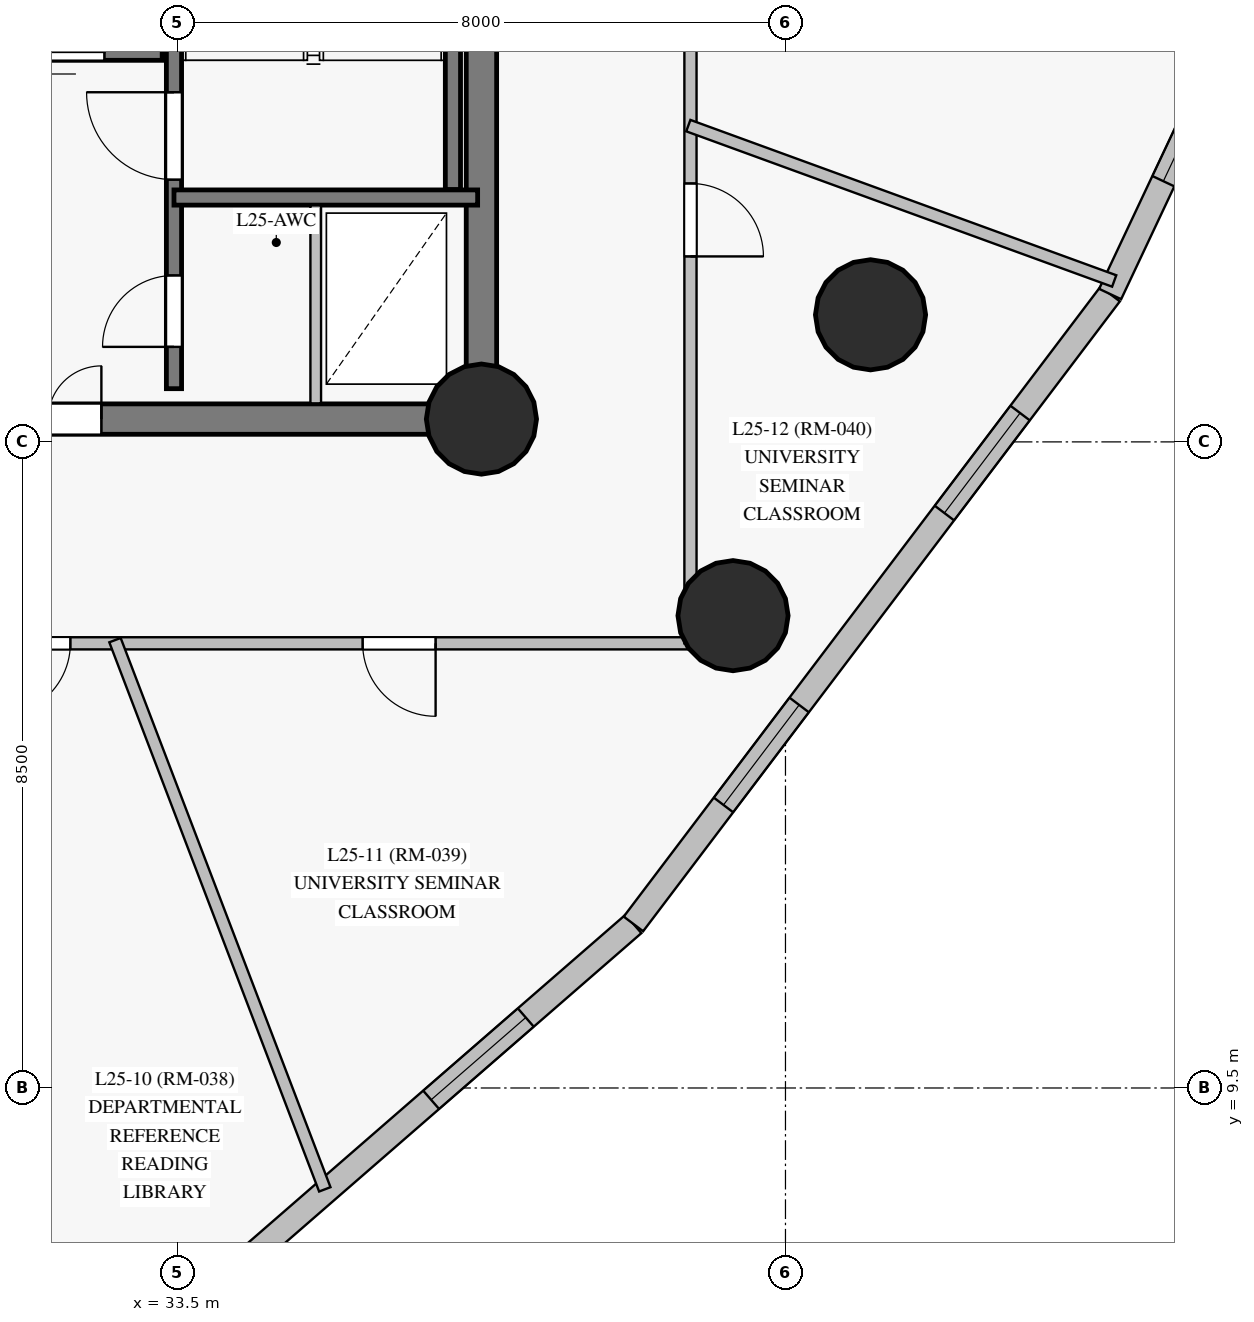
"""IFC4 building model, lengths in metres.
Left out: names, types, materials, properties, quantities, classifications, styles, units other than length and angle.
Written with IfcOpenShell. Run it as: python <this file> out.ifc"""

import sys

from ifc_helpers import new_model, si_unit, direction, frame, frame_2d, origin, origin_with_axes, origin_2d, place, context, subcontext, project, spatial, rectangle, circle, extrude, source, transform, mapped, element, fill, save


model = new_model("IFC4")
c1 = context("Model", 3, precision=1e-05, world=origin(), true_north=direction((0.0, 1.0)))
c2 = subcontext(c1, "Body", "Model", "MODEL_VIEW")
j1 = project(units=[si_unit("LENGTHUNIT", "METRE"), si_unit("PLANEANGLEUNIT", "RADIAN")], contexts=[c1])
p1 = place(None, origin())
s1 = spatial("IfcSite", under=j1, at=p1, CompositionType="ELEMENT")
p2 = place(p1, origin())
s2 = spatial("IfcBuilding", under=s1, at=p2, CompositionType="ELEMENT")
p3 = place(p2, frame((0.0, 0.0, 96.2)))
s3 = spatial("IfcBuildingStorey", under=s2, at=p3, CompositionType="ELEMENT", Elevation=96.2)
p4 = place(p3, frame((26.55, 18.3, 0.0), z_axis=(0.0, 0.0, 1.0), x_axis=(1.0, 0.0, 0.0)))
e1 = element("IfcWall", 1, at=p4, inside=s3, PredefinedType="SHEAR", context=c2, shape_type="SweptSolid", body=[
    extrude(rectangle(XDim=10.95, YDim=0.4, at=frame_2d((5.475, 0.0))), origin(), (0.0, 0.0, 1.0), 2.825),
])
p5 = place(p4, frame((4.55, 0.0, 0.0)))
e2 = element("IfcOpeningElement", 2, at=p5, cuts=e1, PredefinedType="OPENING", context=c2, shape_type="SweptSolid", body=[
    extrude(rectangle(XDim=1.4, YDim=2.2, at=frame_2d((0.7, 1.1))), frame((0.0, 0.21, 0.0), z_axis=(0.0, -1.0, 0.0), x_axis=(1.0, 0.0, 0.0)), (0.0, 0.0, 1.0), 0.42),
])
p6 = place(p3, frame((37.5, 18.3, 0.0), z_axis=(0.0, 0.0, 1.0), x_axis=(0.0, 1.0, 0.0)))
e3 = element("IfcWall", 3, at=p6, inside=s3, PredefinedType="SHEAR", context=c2, shape_type="SweptSolid", body=[
    extrude(rectangle(XDim=16.4, YDim=0.4, at=frame_2d((8.2, 0.0))), origin(), (0.0, 0.0, 1.0), 2.825),
])
p7 = place(p6, frame((14.15, 0.0, 0.0)))
e4 = element("IfcOpeningElement", 4, at=p7, cuts=e3, PredefinedType="OPENING", context=c2, shape_type="SweptSolid", body=[
    extrude(rectangle(XDim=1.2, YDim=2.15, at=frame_2d((0.6, 1.075))), frame((0.0, 0.21, 0.0), z_axis=(0.0, -1.0, 0.0), x_axis=(1.0, 0.0, 0.0)), (0.0, 0.0, 1.0), 0.42),
])
m1 = source(origin_with_axes(), c2, "Body", "SweptSolid", [
    extrude(circle(Radius=0.725, at=origin_2d()), origin(), (0.0, 0.0, 1.0), 3.05),
])
for number, where, z_axis, x_axis in (
    (5, (37.5, 18.3, 0.0), (0.0, 0.0, 1.0), (1.0, 0.0, 0.0)),
    (6, (42.619, 19.672, 0.0), (0.0, 0.0, 1.0), (1.0, 0.0, 0.0)),
    (7, (40.81, 15.714, 0.0), (0.0, 0.0, 1.0), (1.0, 0.0, 0.0)),
):
    element("IfcColumn", number, at=place(p3, frame(where, z_axis=z_axis, x_axis=x_axis)), inside=s3, PredefinedType="COLUMN", context=c2, shape_type="MappedRepresentation", body=[
        mapped(m1, transform((0.0, 0.0, 0.0), scale=1.0)),
    ])
p8 = place(p3, frame((28.218, 1.85, 0.0), z_axis=(0.0, 0.0, 1.0), x_axis=(0.754675133032, 0.65609865385, 0.0)))
e8 = element("IfcWall", 8, at=p8, inside=s3, PredefinedType="SOLIDWALL", context=c2, shape_type="SweptSolid", body=[
    extrude(rectangle(XDim=14.949, YDim=0.32, at=frame_2d((7.475, 0.0))), origin(), (0.0, 0.0, 1.0), 2.825),
])
p9 = place(p8, frame((1.813, 0.0, 0.85)))
e9 = element("IfcOpeningElement", 9, at=p9, cuts=e8, PredefinedType="OPENING", context=c2, shape_type="SweptSolid", body=[
    extrude(rectangle(XDim=1.65, YDim=1.65, at=frame_2d((0.825, 0.825))), frame((0.0, 0.17, 0.0), z_axis=(0.0, -1.0, 0.0), x_axis=(1.0, 0.0, 0.0)), (0.0, 0.0, 1.0), 0.34),
])
p10 = place(p8, frame((6.586, 0.0, 0.85)))
e10 = element("IfcOpeningElement", 10, at=p10, cuts=e8, PredefinedType="OPENING", context=c2, shape_type="SweptSolid", body=[
    extrude(rectangle(XDim=1.65, YDim=1.65, at=frame_2d((0.825, 0.825))), frame((0.0, 0.17, 0.0), z_axis=(0.0, -1.0, 0.0), x_axis=(1.0, 0.0, 0.0)), (0.0, 0.0, 1.0), 0.34),
])
p11 = place(p8, frame((11.423, 0.0, 0.85)))
e11 = element("IfcOpeningElement", 11, at=p11, cuts=e8, PredefinedType="OPENING", context=c2, shape_type="SweptSolid", body=[
    extrude(rectangle(XDim=1.65, YDim=1.65, at=frame_2d((0.825, 0.825))), frame((0.0, 0.17, 0.0), z_axis=(0.0, -1.0, 0.0), x_axis=(1.0, 0.0, 0.0)), (0.0, 0.0, 1.0), 0.34),
])
p12 = place(p3, frame((39.5, 11.658, 0.0), z_axis=(0.0, 0.0, 1.0), x_axis=(0.603493536032, 0.797367889978, 0.0)))
e12 = element("IfcWall", 12, at=p12, inside=s3, PredefinedType="SOLIDWALL", context=c2, shape_type="SweptSolid", body=[
    extrude(rectangle(XDim=10.393, YDim=0.32, at=frame_2d((5.196, 0.0))), origin(), (0.0, 0.0, 1.0), 2.825),
])
p13 = place(p12, frame((1.963, 0.0, 0.85)))
e13 = element("IfcOpeningElement", 13, at=p13, cuts=e12, PredefinedType="OPENING", context=c2, shape_type="SweptSolid", body=[
    extrude(rectangle(XDim=1.65, YDim=1.65, at=frame_2d((0.825, 0.825))), frame((0.0, 0.17, 0.0), z_axis=(0.0, -1.0, 0.0), x_axis=(1.0, 0.0, 0.0)), (0.0, 0.0, 1.0), 0.34),
])
p14 = place(p12, frame((6.78, 0.0, 0.85)))
e14 = element("IfcOpeningElement", 14, at=p14, cuts=e12, PredefinedType="OPENING", context=c2, shape_type="SweptSolid", body=[
    extrude(rectangle(XDim=1.65, YDim=1.65, at=frame_2d((0.825, 0.825))), frame((0.0, 0.17, 0.0), z_axis=(0.0, -1.0, 0.0), x_axis=(1.0, 0.0, 0.0)), (0.0, 0.0, 1.0), 0.34),
])
p15 = place(p3, frame((45.771, 19.945, 0.0), z_axis=(0.0, 0.0, 1.0), x_axis=(0.426458361985, 0.904507194827, 0.0)))
e15 = element("IfcWall", 15, at=p15, inside=s3, PredefinedType="SOLIDWALL", context=c2, shape_type="SweptSolid", body=[
    extrude(rectangle(XDim=14.949, YDim=0.32, at=frame_2d((7.475, 0.0))), origin(), (0.0, 0.0, 1.0), 2.825),
])
p16 = place(p15, frame((1.641, 0.0, 0.85)))
e16 = element("IfcOpeningElement", 16, at=p16, cuts=e15, PredefinedType="OPENING", context=c2, shape_type="SweptSolid", body=[
    extrude(rectangle(XDim=1.65, YDim=1.65, at=frame_2d((0.825, 0.825))), frame((0.0, 0.17, 0.0), z_axis=(0.0, -1.0, 0.0), x_axis=(1.0, 0.0, 0.0)), (0.0, 0.0, 1.0), 0.34),
])
p17 = place(p15, frame((5.584, 0.0, 0.85)))
e17 = element("IfcOpeningElement", 17, at=p17, cuts=e15, PredefinedType="OPENING", context=c2, shape_type="SweptSolid", body=[
    extrude(rectangle(XDim=1.65, YDim=1.65, at=frame_2d((0.825, 0.825))), frame((0.0, 0.17, 0.0), z_axis=(0.0, -1.0, 0.0), x_axis=(1.0, 0.0, 0.0)), (0.0, 0.0, 1.0), 0.34),
])
p18 = place(p15, frame((9.491, 0.0, 0.85)))
e18 = element("IfcOpeningElement", 18, at=p18, cuts=e15, PredefinedType="OPENING", context=c2, shape_type="SweptSolid", body=[
    extrude(rectangle(XDim=1.65, YDim=1.65, at=frame_2d((0.825, 0.825))), frame((0.0, 0.17, 0.0), z_axis=(0.0, -1.0, 0.0), x_axis=(1.0, 0.0, 0.0)), (0.0, 0.0, 1.0), 0.34),
])
p19 = place(p15, frame((12.586, 0.0, 0.85)))
e19 = element("IfcOpeningElement", 19, at=p19, cuts=e15, PredefinedType="OPENING", context=c2, shape_type="SweptSolid", body=[
    extrude(rectangle(XDim=1.65, YDim=1.65, at=frame_2d((0.825, 0.825))), frame((0.0, 0.17, 0.0), z_axis=(0.0, -1.0, 0.0), x_axis=(1.0, 0.0, 0.0)), (0.0, 0.0, 1.0), 0.34),
])
p20 = place(p3, frame((33.455, 18.7, 0.0), z_axis=(0.0, 0.0, 1.0), x_axis=(0.0, 1.0, 0.0)))
e20 = element("IfcWall", 20, at=p20, inside=s3, PredefinedType="SHEAR", context=c2, shape_type="SweptSolid", body=[
    extrude(rectangle(XDim=15.6, YDim=0.2, at=frame_2d((7.8, 0.0))), origin(), (0.0, 0.0, 1.0), 2.825),
])
p21 = place(p20, frame((2.75, 0.0, 0.0)))
e21 = element("IfcOpeningElement", 21, at=p21, cuts=e20, PredefinedType="OPENING", context=c2, shape_type="SweptSolid", body=[
    extrude(rectangle(XDim=1.15, YDim=2.15, at=frame_2d((0.575, 1.075))), frame((0.0, 0.11, 0.0), z_axis=(0.0, -1.0, 0.0), x_axis=(1.0, 0.0, 0.0)), (0.0, 0.0, 1.0), 0.22),
])
p22 = place(p20, frame((0.55, 0.0, 0.0)))
e22 = element("IfcOpeningElement", 22, at=p22, cuts=e20, PredefinedType="OPENING", context=c2, shape_type="SweptSolid", body=[
    extrude(rectangle(XDim=0.94, YDim=2.1, at=frame_2d((0.47, 1.05))), frame((0.0, 0.11, 0.0), z_axis=(0.0, -1.0, 0.0), x_axis=(1.0, 0.0, 0.0)), (0.0, 0.0, 1.0), 0.22),
])
p23 = place(p3, frame((23.7, 23.12, 0.0), z_axis=(0.0, 0.0, 1.0), x_axis=(1.0, 0.0, 0.0)))
e23 = element("IfcWall", 23, at=p23, inside=s3, PredefinedType="SHEAR", context=c2, shape_type="SweptSolid", body=[
    extrude(rectangle(XDim=9.6, YDim=0.2, at=frame_2d((4.8, 0.0))), origin(), (0.0, 0.0, 1.0), 2.825),
])
p24 = place(p23, frame((0.6, 0.0, 0.0)))
e24 = element("IfcOpeningElement", 24, at=p24, cuts=e23, PredefinedType="OPENING", context=c2, shape_type="SweptSolid", body=[
    extrude(rectangle(XDim=1.1, YDim=2.15, at=frame_2d((0.55, 1.075))), frame((0.0, 0.11, 0.0), z_axis=(0.0, -1.0, 0.0), x_axis=(1.0, 0.0, 0.0)), (0.0, 0.0, 1.0), 0.22),
])
p25 = place(p23, frame((2.98, 0.0, 0.0)))
e25 = element("IfcOpeningElement", 25, at=p25, cuts=e23, PredefinedType="OPENING", context=c2, shape_type="SweptSolid", body=[
    extrude(rectangle(XDim=1.1, YDim=2.15, at=frame_2d((0.55, 1.075))), frame((0.0, 0.11, 0.0), z_axis=(0.0, -1.0, 0.0), x_axis=(1.0, 0.0, 0.0)), (0.0, 0.0, 1.0), 0.22),
])
p26 = place(p23, frame((5.36, 0.0, 0.0)))
e26 = element("IfcOpeningElement", 26, at=p26, cuts=e23, PredefinedType="OPENING", context=c2, shape_type="SweptSolid", body=[
    extrude(rectangle(XDim=1.1, YDim=2.15, at=frame_2d((0.55, 1.075))), frame((0.0, 0.11, 0.0), z_axis=(0.0, -1.0, 0.0), x_axis=(1.0, 0.0, 0.0)), (0.0, 0.0, 1.0), 0.22),
])
p27 = place(p23, frame((7.74, 0.0, 0.0)))
e27 = element("IfcOpeningElement", 27, at=p27, cuts=e23, PredefinedType="OPENING", context=c2, shape_type="SweptSolid", body=[
    extrude(rectangle(XDim=1.1, YDim=2.15, at=frame_2d((0.55, 1.075))), frame((0.0, 0.11, 0.0), z_axis=(0.0, -1.0, 0.0), x_axis=(1.0, 0.0, 0.0)), (0.0, 0.0, 1.0), 0.22),
])
p28 = place(p3, frame((37.125, 21.32, 0.0), z_axis=(0.0, 0.0, 1.0), x_axis=(0.0, 1.0, 0.0)))
e28 = element("IfcWall", 28, at=p28, inside=s3, PredefinedType="SHEAR", context=c2, shape_type="SweptSolid", body=[
    extrude(rectangle(XDim=7.5, YDim=0.2, at=frame_2d((3.75, 0.0))), origin(), (0.0, 0.0, 1.0), 2.825),
])
p29 = place(p3, frame((33.455, 21.215, 0.0), z_axis=(0.0, 0.0, 1.0), x_axis=(1.0, 0.0, 0.0)))
e29 = element("IfcWall", 29, at=p29, inside=s3, PredefinedType="SHEAR", context=c2, shape_type="SweptSolid", body=[
    extrude(rectangle(XDim=3.995, YDim=0.2, at=frame_2d((1.998, 0.0))), origin(), (0.0, 0.0, 1.0), 2.825),
])
p30 = place(p3, frame((40.25, 15.35, 0.0), z_axis=(0.0, 0.0, 1.0), x_axis=(-1.0, 0.0, 0.0)))
e30 = element("IfcWall", 30, at=p30, inside=s3, PredefinedType="PARTITIONING", context=c2, shape_type="SweptSolid", body=[
    extrude(rectangle(XDim=29.75, YDim=0.16, at=frame_2d((14.875, 0.0))), origin(), (0.0, 0.0, 1.0), 2.225),
])
p31 = place(p30, frame((22.127, 0.0, 0.0)))
e31 = element("IfcOpeningElement", 31, at=p31, cuts=e30, PredefinedType="OPENING", context=c2, shape_type="SweptSolid", body=[
    extrude(rectangle(XDim=0.95, YDim=2.15, at=frame_2d((0.475, 1.075))), frame((0.0, 0.09, 0.0), z_axis=(0.0, -1.0, 0.0), x_axis=(1.0, 0.0, 0.0)), (0.0, 0.0, 1.0), 0.18),
])
p32 = place(p30, frame((14.4, 0.0, 0.0)))
e32 = element("IfcOpeningElement", 32, at=p32, cuts=e30, PredefinedType="OPENING", context=c2, shape_type="SweptSolid", body=[
    extrude(rectangle(XDim=0.96, YDim=2.15, at=frame_2d((0.48, 1.075))), frame((0.0, 0.09, 0.0), z_axis=(0.0, -1.0, 0.0), x_axis=(1.0, 0.0, 0.0)), (0.0, 0.0, 1.0), 0.18),
])
p33 = place(p30, frame((10.127, 0.0, 0.0)))
e33 = element("IfcOpeningElement", 33, at=p33, cuts=e30, PredefinedType="OPENING", context=c2, shape_type="SweptSolid", body=[
    extrude(rectangle(XDim=0.96, YDim=2.15, at=frame_2d((0.48, 1.075))), frame((0.0, 0.09, 0.0), z_axis=(0.0, -1.0, 0.0), x_axis=(1.0, 0.0, 0.0)), (0.0, 0.0, 1.0), 0.18),
])
p34 = place(p30, frame((8.158, 0.0, 0.0)))
e34 = element("IfcOpeningElement", 34, at=p34, cuts=e30, PredefinedType="OPENING", context=c2, shape_type="SweptSolid", body=[
    extrude(rectangle(XDim=0.95, YDim=2.15, at=frame_2d((0.475, 1.075))), frame((0.0, 0.09, 0.0), z_axis=(0.0, -1.0, 0.0), x_axis=(1.0, 0.0, 0.0)), (0.0, 0.0, 1.0), 0.18),
])
p35 = place(p30, frame((3.353, 0.0, 0.0)))
e35 = element("IfcOpeningElement", 35, at=p35, cuts=e30, PredefinedType="OPENING", context=c2, shape_type="SweptSolid", body=[
    extrude(rectangle(XDim=0.96, YDim=2.15, at=frame_2d((0.48, 1.075))), frame((0.0, 0.09, 0.0), z_axis=(0.0, -1.0, 0.0), x_axis=(1.0, 0.0, 0.0)), (0.0, 0.0, 1.0), 0.18),
])
p36 = place(p3, frame((40.25, 37.65, 0.0), z_axis=(0.0, 0.0, 1.0), x_axis=(0.0, -1.0, 0.0)))
e36 = element("IfcWall", 36, at=p36, inside=s3, PredefinedType="PARTITIONING", context=c2, shape_type="SweptSolid", body=[
    extrude(rectangle(XDim=22.3, YDim=0.16, at=frame_2d((11.15, 0.0))), origin(), (0.0, 0.0, 1.0), 2.225),
])
p37 = place(p36, frame((16.25, 0.0, 0.0)))
e37 = element("IfcOpeningElement", 37, at=p37, cuts=e36, PredefinedType="OPENING", context=c2, shape_type="SweptSolid", body=[
    extrude(rectangle(XDim=0.96, YDim=2.15, at=frame_2d((0.48, 1.075))), frame((0.0, 0.09, 0.0), z_axis=(0.0, -1.0, 0.0), x_axis=(1.0, 0.0, 0.0)), (0.0, 0.0, 1.0), 0.18),
])
p38 = place(p36, frame((10.675, 0.0, 0.0)))
e38 = element("IfcOpeningElement", 38, at=p38, cuts=e36, PredefinedType="OPENING", context=c2, shape_type="SweptSolid", body=[
    extrude(rectangle(XDim=0.95, YDim=2.15, at=frame_2d((0.475, 1.075))), frame((0.0, 0.09, 0.0), z_axis=(0.0, -1.0, 0.0), x_axis=(1.0, 0.0, 0.0)), (0.0, 0.0, 1.0), 0.18),
])
p39 = place(p36, frame((9.177, 0.0, 0.0)))
e39 = element("IfcOpeningElement", 39, at=p39, cuts=e36, PredefinedType="OPENING", context=c2, shape_type="SweptSolid", body=[
    extrude(rectangle(XDim=0.86, YDim=2.1, at=frame_2d((0.43, 1.05))), frame((0.0, 0.09, 0.0), z_axis=(0.0, -1.0, 0.0), x_axis=(1.0, 0.0, 0.0)), (0.0, 0.0, 1.0), 0.18),
])
p40 = place(p36, frame((7.33, 0.0, 0.0)))
e40 = element("IfcOpeningElement", 40, at=p40, cuts=e36, PredefinedType="OPENING", context=c2, shape_type="SweptSolid", body=[
    extrude(rectangle(XDim=0.96, YDim=2.15, at=frame_2d((0.48, 1.075))), frame((0.0, 0.09, 0.0), z_axis=(0.0, -1.0, 0.0), x_axis=(1.0, 0.0, 0.0)), (0.0, 0.0, 1.0), 0.18),
])
p41 = place(p36, frame((5.24, 0.0, 0.0)))
e41 = element("IfcOpeningElement", 41, at=p41, cuts=e36, PredefinedType="OPENING", context=c2, shape_type="SweptSolid", body=[
    extrude(rectangle(XDim=0.95, YDim=2.15, at=frame_2d((0.475, 1.075))), frame((0.0, 0.09, 0.0), z_axis=(0.0, -1.0, 0.0), x_axis=(1.0, 0.0, 0.0)), (0.0, 0.0, 1.0), 0.18),
])
p42 = place(p36, frame((2.38, 0.0, 0.0)))
e42 = element("IfcOpeningElement", 42, at=p42, cuts=e36, PredefinedType="OPENING", context=c2, shape_type="SweptSolid", body=[
    extrude(rectangle(XDim=0.96, YDim=2.15, at=frame_2d((0.48, 1.075))), frame((0.0, 0.09, 0.0), z_axis=(0.0, -1.0, 0.0), x_axis=(1.0, 0.0, 0.0)), (0.0, 0.0, 1.0), 0.18),
])
p43 = place(p3, frame((30.365, 15.394, 0.0), z_axis=(0.0, 0.0, 1.0), x_axis=(0.170863116861, -0.985294775839, 0.0)))
e43 = element("IfcWall", 43, at=p43, inside=s3, PredefinedType="PARTITIONING", context=c2, shape_type="SweptSolid", body=[
    extrude(rectangle(XDim=10.259, YDim=0.16, at=frame_2d((5.13, 0.0))), origin(), (0.0, 0.0, 1.0), 2.825),
])
p44 = place(p3, frame((32.679, 15.392, 0.0), z_axis=(0.0, 0.0, 1.0), x_axis=(0.356831287963, -0.934168845515, 0.0)))
e44 = element("IfcWall", 44, at=p44, inside=s3, PredefinedType="PARTITIONING", context=c2, shape_type="SweptSolid", body=[
    extrude(rectangle(XDim=7.735, YDim=0.16, at=frame_2d((3.867, 0.0))), origin(), (0.0, 0.0, 1.0), 2.825),
])
p45 = place(p3, frame((40.222, 22.161, 0.0), z_axis=(0.0, 0.0, 1.0), x_axis=(0.939457123794, -0.342666474217, 0.0)))
e45 = element("IfcWall", 45, at=p45, inside=s3, PredefinedType="PARTITIONING", context=c2, shape_type="SweptSolid", body=[
    extrude(rectangle(XDim=5.964, YDim=0.16, at=frame_2d((2.982, 0.0))), origin(), (0.0, 0.0, 1.0), 2.825),
])
p46 = place(p3, frame((35.32, 18.507, 0.0), z_axis=(0.0, 0.0, 1.0), x_axis=(0.0, 1.0, 0.0)))
e46 = element("IfcWall", 46, at=p46, inside=s3, PredefinedType="PARTITIONING", context=c2, shape_type="SweptSolid", body=[
    extrude(rectangle(XDim=2.604, YDim=0.14, at=frame_2d((1.302, 0.0))), origin(), (0.0, 0.0, 1.0), 2.825),
])
m2 = source(origin_with_axes(), c2, "Body", "SweptSolid", [
    extrude(rectangle(XDim=1.65, YDim=1.65, at=frame_2d((0.825, 0.825))), frame((0.0, 0.03, 0.0), z_axis=(0.0, -1.0, 0.0), x_axis=(1.0, 0.0, 0.0)), (0.0, 0.0, 1.0), 0.06),
])
p47 = place(p11, origin())
e47 = element("IfcWindow", 47, at=p47, inside=s3, PartitioningType="SINGLE_PANEL", PredefinedType="WINDOW", context=c2, shape_type="MappedRepresentation", body=[
    mapped(m2, transform((0.0, 0.0, 0.0), scale=1.0)),
])
fill(e11, e47)
p48 = place(p13, origin())
e48 = element("IfcWindow", 48, at=p48, inside=s3, PartitioningType="SINGLE_PANEL", PredefinedType="WINDOW", context=c2, shape_type="MappedRepresentation", body=[
    mapped(m2, transform((0.0, 0.0, 0.0), scale=1.0)),
])
fill(e13, e48)
p49 = place(p14, origin())
e49 = element("IfcWindow", 49, at=p49, inside=s3, PartitioningType="SINGLE_PANEL", PredefinedType="WINDOW", context=c2, shape_type="MappedRepresentation", body=[
    mapped(m2, transform((0.0, 0.0, 0.0), scale=1.0)),
])
fill(e14, e49)
p50 = place(p16, origin())
e50 = element("IfcWindow", 50, at=p50, inside=s3, PartitioningType="SINGLE_PANEL", PredefinedType="WINDOW", context=c2, shape_type="MappedRepresentation", body=[
    mapped(m2, transform((0.0, 0.0, 0.0), scale=1.0)),
])
fill(e16, e50)
m3 = source(origin_with_axes(), c2, "Body", "SweptSolid", [
    extrude(rectangle(XDim=1.15, YDim=2.15, at=frame_2d((0.575, 1.075))), frame((0.0, 0.025, 0.0), z_axis=(0.0, -1.0, 0.0), x_axis=(1.0, 0.0, 0.0)), (0.0, 0.0, 1.0), 0.05),
])
p51 = place(p21, origin())
e51 = element("IfcDoor", 51, at=p51, inside=s3, OperationType="SINGLE_SWING_RIGHT", PredefinedType="DOOR", context=c2, shape_type="MappedRepresentation", body=[
    mapped(m3, transform((0.0, 0.0, 0.0), scale=1.0)),
])
fill(e21, e51)
m4 = source(origin_with_axes(), c2, "Body", "SweptSolid", [
    extrude(rectangle(XDim=1.4, YDim=2.2, at=frame_2d((0.7, 1.1))), frame((0.0, 0.025, 0.0), z_axis=(0.0, -1.0, 0.0), x_axis=(1.0, 0.0, 0.0)), (0.0, 0.0, 1.0), 0.05),
])
p52 = place(p5, origin())
e52 = element("IfcDoor", 52, at=p52, inside=s3, OperationType="DOUBLE_DOOR_SINGLE_SWING", PredefinedType="DOOR", context=c2, shape_type="MappedRepresentation", body=[
    mapped(m4, transform((0.0, 0.0, 0.0), scale=1.0)),
])
fill(e2, e52)
m5 = source(origin_with_axes(), c2, "Body", "SweptSolid", [
    extrude(rectangle(XDim=0.94, YDim=2.1, at=frame_2d((0.47, 1.05))), frame((0.0, 0.025, 0.0), z_axis=(0.0, -1.0, 0.0), x_axis=(1.0, 0.0, 0.0)), (0.0, 0.0, 1.0), 0.05),
])
p53 = place(p22, origin())
e53 = element("IfcDoor", 53, at=p53, inside=s3, OperationType="SINGLE_SWING_LEFT", PredefinedType="DOOR", context=c2, shape_type="MappedRepresentation", body=[
    mapped(m5, transform((0.0, 0.0, 0.0), scale=1.0)),
])
fill(e22, e53)
m6 = source(origin_with_axes(), c2, "Body", "SweptSolid", [
    extrude(rectangle(XDim=1.1, YDim=2.15, at=frame_2d((0.55, 1.075))), frame((0.0, 0.025, 0.0), z_axis=(0.0, -1.0, 0.0), x_axis=(1.0, 0.0, 0.0)), (0.0, 0.0, 1.0), 0.05),
])
p54 = place(p27, origin())
e54 = element("IfcDoor", 54, at=p54, inside=s3, OperationType="SLIDING_TO_RIGHT", PredefinedType="DOOR", context=c2, shape_type="MappedRepresentation", body=[
    mapped(m6, transform((0.0, 0.0, 0.0), scale=1.0)),
])
fill(e27, e54)
m7 = source(origin_with_axes(), c2, "Body", "SweptSolid", [
    extrude(rectangle(XDim=0.95, YDim=2.15, at=frame_2d((0.475, 1.075))), frame((0.0, 0.025, 0.0), z_axis=(0.0, -1.0, 0.0), x_axis=(1.0, 0.0, 0.0)), (0.0, 0.0, 1.0), 0.05),
])
p55 = place(p34, origin())
e55 = element("IfcDoor", 55, at=p55, inside=s3, OperationType="SINGLE_SWING_RIGHT", PredefinedType="DOOR", context=c2, shape_type="MappedRepresentation", body=[
    mapped(m7, transform((0.0, 0.0, 0.0), scale=1.0)),
])
fill(e34, e55)
m8 = source(origin_with_axes(), c2, "Body", "SweptSolid", [
    extrude(rectangle(XDim=0.96, YDim=2.15, at=frame_2d((0.48, 1.075))), frame((0.0, 0.025, 0.0), z_axis=(0.0, -1.0, 0.0), x_axis=(1.0, 0.0, 0.0)), (0.0, 0.0, 1.0), 0.05),
])
p56 = place(p35, origin())
e56 = element("IfcDoor", 56, at=p56, inside=s3, OperationType="SINGLE_SWING_LEFT", PredefinedType="DOOR", context=c2, shape_type="MappedRepresentation", body=[
    mapped(m8, transform((0.0, 0.0, 0.0), scale=1.0)),
])
fill(e35, e56)
p57 = place(p37, origin())
e57 = element("IfcDoor", 57, at=p57, inside=s3, OperationType="SINGLE_SWING_RIGHT", PredefinedType="DOOR", context=c2, shape_type="MappedRepresentation", body=[
    mapped(m8, transform((0.0, 0.0, 0.0), scale=1.0)),
])
fill(e37, e57)
save(model, sys.argv[1])
